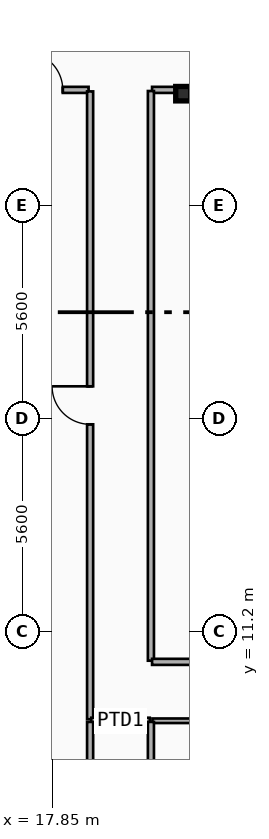
"""IFC4 building model, lengths in metres.
Left out: names, types, materials, properties, quantities, classifications, styles, units other than length and angle.
Written with IfcOpenShell. Run it as: python <this file> out.ifc"""

import sys

from ifc_helpers import new_model, si_unit, direction, frame, frame_2d, origin, origin_2d, place, context, subcontext, project, spatial, rectangle, i_section, extrude, element, fill, save


model = new_model("IFC4")
c1 = context("Model", 3, precision=1e-05, world=origin(), true_north=direction((0.0, 1.0)))
c2 = subcontext(c1, "Body", "Model", "MODEL_VIEW")
j1 = project(units=[si_unit("LENGTHUNIT", "METRE"), si_unit("PLANEANGLEUNIT", "RADIAN")], contexts=[c1])
p1 = place(None, origin())
s1 = spatial("IfcSite", under=j1, at=p1, CompositionType="ELEMENT")
p2 = place(p1, origin())
s2 = spatial("IfcBuilding", under=s1, at=p2, CompositionType="ELEMENT")
p3 = place(p2, frame((0.0, 0.0, 254.7)))
s3 = spatial("IfcBuildingStorey", under=s2, at=p3, CompositionType="ELEMENT", Elevation=254.7)
p4 = place(p3, frame((21.3, 25.35, 0.0), z_axis=(0.0, 0.0, 1.0), x_axis=(1.0, 0.0, 0.0)))
e1 = element("IfcColumn", 1, at=p4, inside=s3, PredefinedType="COLUMN", context=c2, shape_type="SweptSolid", body=[
    extrude(i_section(OverallWidth=0.395, OverallDepth=0.38, WebThickness=0.019, FlangeThickness=0.03, FilletRadius=0.015, at=origin_2d()), origin(), (0.0, 0.0, 1.0), 3.7),
])
p5 = place(p3, frame((16.451, 25.45, 0.0), z_axis=(0.0, 0.0, 1.0), x_axis=(1.0, 0.0, 0.0)))
e2 = element("IfcWall", 2, at=p5, inside=s3, PredefinedType="PARTITIONING", context=c2, shape_type="SweptSolid", body=[
    extrude(rectangle(XDim=2.359, YDim=0.16, at=frame_2d((1.18, 0.0))), origin(), (0.0, 0.0, 1.0), 3.42),
])
p6 = place(p5, frame((0.679, 0.0, 0.0)))
e3 = element("IfcOpeningElement", 3, at=p6, cuts=e2, PredefinedType="OPENING", context=c2, shape_type="SweptSolid", body=[
    extrude(rectangle(XDim=1.0, YDim=2.15, at=frame_2d((0.5, 1.075))), frame((0.0, 0.09, 0.0), z_axis=(0.0, -1.0, 0.0), x_axis=(1.0, 0.0, 0.0)), (0.0, 0.0, 1.0), 0.18),
])
p7 = place(p3, frame((18.85, 8.89, 0.0), z_axis=(0.0, 0.0, 1.0), x_axis=(0.0, 1.0, 0.0)))
e4 = element("IfcWall", 4, at=p7, inside=s3, PredefinedType="PARTITIONING", context=c2, shape_type="SweptSolid", body=[
    extrude(rectangle(XDim=16.52, YDim=0.16, at=frame_2d((8.26, 0.0))), origin(), (0.0, 0.0, 1.0), 2.9),
])
p8 = place(p7, frame((7.76, 0.0, 0.0)))
e5 = element("IfcOpeningElement", 5, at=p8, cuts=e4, PredefinedType="OPENING", context=c2, shape_type="SweptSolid", body=[
    extrude(rectangle(XDim=1.0, YDim=2.15, at=frame_2d((0.5, 1.075))), frame((0.0, 0.09, 0.0), z_axis=(0.0, -1.0, 0.0), x_axis=(1.0, 0.0, 0.0)), (0.0, 0.0, 1.0), 0.18),
])
p9 = place(p3, frame((20.49, 8.85, 0.0), z_axis=(0.0, 0.0, 1.0), x_axis=(1.0, 0.0, 0.0)))
e6 = element("IfcWall", 6, at=p9, inside=s3, PredefinedType="PARTITIONING", context=c2, shape_type="SweptSolid", body=[
    extrude(rectangle(XDim=15.82, YDim=0.12, at=frame_2d((7.91, 0.0))), origin(), (0.0, 0.0, 1.0), 2.7),
])
p10 = place(p9, frame((7.46, 0.0, 0.0)))
e7 = element("IfcOpeningElement", 7, at=p10, cuts=e6, PredefinedType="OPENING", context=c2, shape_type="SweptSolid", body=[
    extrude(rectangle(XDim=0.9, YDim=2.1, at=frame_2d((0.45, 1.05))), frame((0.0, 0.07, 0.0), z_axis=(0.0, -1.0, 0.0), x_axis=(1.0, 0.0, 0.0)), (0.0, 0.0, 1.0), 0.14),
])
p11 = place(p3, frame((20.48, 25.45, 0.0), z_axis=(0.0, 0.0, 1.0), x_axis=(1.0, 0.0, 0.0)))
e8 = element("IfcWall", 8, at=p11, inside=s3, PredefinedType="PARTITIONING", context=c2, shape_type="SweptSolid", body=[
    extrude(rectangle(XDim=15.84, YDim=0.16, at=frame_2d((7.92, 0.0))), origin(), (0.0, 0.0, 1.0), 2.7),
])
p12 = place(p3, frame((18.88, 8.85, 0.0), z_axis=(0.0, 0.0, 1.0), x_axis=(1.0, 0.0, 0.0)))
e9 = element("IfcWall", 9, at=p12, inside=s3, PredefinedType="PARTITIONING", context=c2, shape_type="SweptSolid", body=[
    extrude(rectangle(XDim=1.54, YDim=0.16, at=frame_2d((0.77, 0.0))), origin(), (0.0, 0.0, 1.0), 3.42),
])
p13 = place(p3, frame((20.45, 10.43, 0.0), z_axis=(0.0, 0.0, 1.0), x_axis=(0.0, 1.0, 0.0)))
e10 = element("IfcWall", 10, at=p13, inside=s3, PredefinedType="PARTITIONING", context=c2, shape_type="SweptSolid", body=[
    extrude(rectangle(XDim=14.99, YDim=0.16, at=frame_2d((7.495, 0.0))), origin(), (0.0, 0.0, 1.0), 2.9),
])
p14 = place(p3, frame((20.48, 10.4, 0.0), z_axis=(0.0, 0.0, 1.0), x_axis=(1.0, 0.0, 0.0)))
e11 = element("IfcWall", 11, at=p14, inside=s3, PredefinedType="PARTITIONING", context=c2, shape_type="SweptSolid", body=[
    extrude(rectangle(XDim=2.64, YDim=0.16, at=frame_2d((1.32, 0.0))), origin(), (0.0, 0.0, 1.0), 2.7),
])
for number, where, z_axis, x_axis in (
    (12, (18.85, -1.31, 0.0), (0.0, 0.0, 1.0), (0.0, 1.0, 0.0)),
    (13, (20.45, -1.31, 0.0), (0.0, 0.0, 1.0), (0.0, 1.0, 0.0)),
):
    element("IfcWall", number, at=place(p3, frame(where, z_axis=z_axis, x_axis=x_axis)), inside=s3, PredefinedType="PARTITIONING", context=c2, shape_type="SweptSolid", body=[
        extrude(rectangle(XDim=10.13, YDim=0.16, at=frame_2d((5.065, 0.0))), origin(), (0.0, 0.0, 1.0), 2.9),
    ])
p15 = place(p6, origin())
e14 = element("IfcDoor", 14, at=p15, inside=s3, OperationType="SINGLE_SWING_LEFT", PredefinedType="DOOR", context=c2, shape_type="SweptSolid", body=[
    extrude(rectangle(XDim=1.0, YDim=2.15, at=frame_2d((0.5, 1.075))), frame((0.0, 0.025, 0.0), z_axis=(0.0, -1.0, 0.0), x_axis=(1.0, 0.0, 0.0)), (0.0, 0.0, 1.0), 0.05),
])
fill(e3, e14)
p16 = place(p8, origin())
e15 = element("IfcDoor", 15, at=p16, inside=s3, OperationType="SINGLE_SWING_RIGHT", PredefinedType="DOOR", context=c2, shape_type="SweptSolid", body=[
    extrude(rectangle(XDim=1.0, YDim=2.15, at=frame_2d((0.5, 1.075))), frame((0.0, 0.025, 0.0), z_axis=(0.0, -1.0, 0.0), x_axis=(1.0, 0.0, 0.0)), (0.0, 0.0, 1.0), 0.05),
])
fill(e5, e15)
save(model, sys.argv[1])
